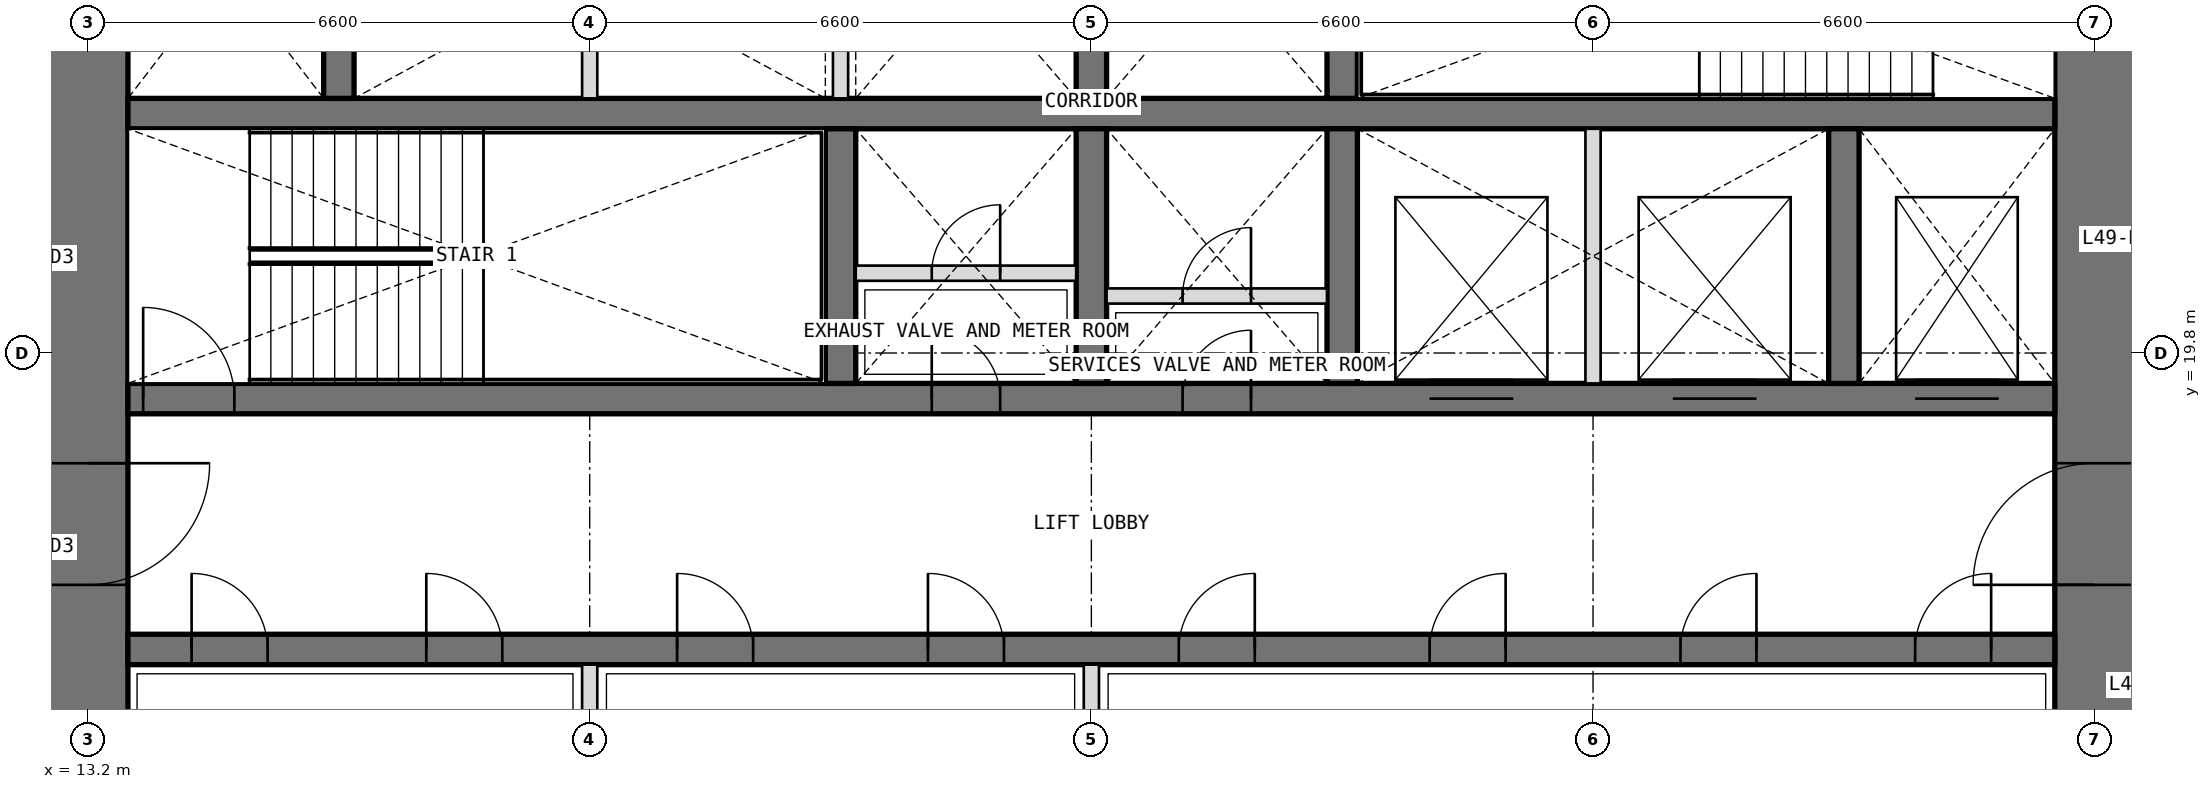
"""IFC4 building model, lengths in metres.
Left out: names, types, materials, properties, quantities, classifications, styles, units other than length and angle.
Written with IfcOpenShell. Run it as: python <this file> out.ifc"""

import sys

from ifc_helpers import new_model, si_unit, direction, frame, frame_2d, origin, place, context, subcontext, project, spatial, rectangle, extrude, element, fill, save


model = new_model("IFC4")
c1 = context("Model", 3, precision=1e-05, world=origin(), true_north=direction((0.0, 1.0)))
c2 = subcontext(c1, "Body", "Model", "MODEL_VIEW")
j1 = project(units=[si_unit("LENGTHUNIT", "METRE"), si_unit("PLANEANGLEUNIT", "RADIAN")], contexts=[c1])
p1 = place(None, origin())
s1 = spatial("IfcSite", under=j1, at=p1, CompositionType="ELEMENT")
p2 = place(p1, origin())
s2 = spatial("IfcBuilding", under=s1, at=p2, CompositionType="ELEMENT")
p3 = place(p2, frame((0.0, 0.0, 214.5)))
s3 = spatial("IfcBuildingStorey", under=s2, at=p3, CompositionType="ELEMENT", Elevation=214.5)
p4 = place(p3, frame((39.6, 13.725, 0.0), z_axis=(0.0, 0.0, 1.0), x_axis=(0.0, 1.0, 0.0)))
e1 = element("IfcWall", 1, at=p4, inside=s3, PredefinedType="SHEAR", context=c2, shape_type="SweptSolid", body=[
    extrude(rectangle(XDim=18.75, YDim=1.05, at=frame_2d((9.375, 0.0))), origin(), (0.0, 0.0, 1.0), 4.2),
])
p5 = place(p4, frame((3.025, 0.0, 0.0)))
e2 = element("IfcOpeningElement", 2, at=p5, cuts=e1, PredefinedType="OPENING", context=c2, shape_type="SweptSolid", body=[
    extrude(rectangle(XDim=1.6, YDim=2.1, at=frame_2d((0.8, 1.05))), frame((0.0, 0.535, 0.0), z_axis=(0.0, -1.0, 0.0), x_axis=(1.0, 0.0, 0.0)), (0.0, 0.0, 1.0), 1.07),
])
p6 = place(p4, frame((13.825, 0.0, 0.0)))
e3 = element("IfcOpeningElement", 3, at=p6, cuts=e1, PredefinedType="OPENING", context=c2, shape_type="SweptSolid", body=[
    extrude(rectangle(XDim=1.6, YDim=2.1, at=frame_2d((0.8, 1.05))), frame((0.0, 0.535, 0.0), z_axis=(0.0, -1.0, 0.0), x_axis=(1.0, 0.0, 0.0)), (0.0, 0.0, 1.0), 1.07),
])
p7 = place(p3, frame((13.2, 32.475, 0.0), z_axis=(0.0, 0.0, 1.0), x_axis=(0.0, -1.0, 0.0)))
e4 = element("IfcWall", 4, at=p7, inside=s3, PredefinedType="SHEAR", context=c2, shape_type="SweptSolid", body=[
    extrude(rectangle(XDim=18.75, YDim=1.05, at=frame_2d((9.375, 0.0))), origin(), (0.0, 0.0, 1.0), 4.2),
])
p8 = place(p7, frame((14.125, 0.0, 0.0)))
e5 = element("IfcOpeningElement", 5, at=p8, cuts=e4, PredefinedType="OPENING", context=c2, shape_type="SweptSolid", body=[
    extrude(rectangle(XDim=1.6, YDim=2.1, at=frame_2d((0.8, 1.05))), frame((0.0, 0.535, 0.0), z_axis=(0.0, -1.0, 0.0), x_axis=(1.0, 0.0, 0.0)), (0.0, 0.0, 1.0), 1.07),
])
p9 = place(p7, frame((3.325, 0.0, 0.0)))
e6 = element("IfcOpeningElement", 6, at=p9, cuts=e4, PredefinedType="OPENING", context=c2, shape_type="SweptSolid", body=[
    extrude(rectangle(XDim=1.6, YDim=2.1, at=frame_2d((0.8, 1.05))), frame((0.0, 0.535, 0.0), z_axis=(0.0, -1.0, 0.0), x_axis=(1.0, 0.0, 0.0)), (0.0, 0.0, 1.0), 1.07),
])
p10 = place(p3, frame((13.725, 15.9, 0.0), z_axis=(0.0, 0.0, 1.0), x_axis=(1.0, 0.0, 0.0)))
e7 = element("IfcWall", 7, at=p10, inside=s3, PredefinedType="SHEAR", context=c2, shape_type="SweptSolid", body=[
    extrude(rectangle(XDim=25.35, YDim=0.4, at=frame_2d((12.675, 0.0))), origin(), (0.0, 0.0, 1.0), 4.2),
])
p11 = place(p10, frame((0.837, 0.0, 0.0)))
e8 = element("IfcOpeningElement", 8, at=p11, cuts=e7, PredefinedType="OPENING", context=c2, shape_type="SweptSolid", body=[
    extrude(rectangle(XDim=1.0, YDim=2.1, at=frame_2d((0.5, 1.05))), frame((0.0, 0.21, 0.0), z_axis=(0.0, -1.0, 0.0), x_axis=(1.0, 0.0, 0.0)), (0.0, 0.0, 1.0), 0.42),
])
p12 = place(p10, frame((3.925, 0.0, 0.0)))
e9 = element("IfcOpeningElement", 9, at=p12, cuts=e7, PredefinedType="OPENING", context=c2, shape_type="SweptSolid", body=[
    extrude(rectangle(XDim=1.0, YDim=2.1, at=frame_2d((0.5, 1.05))), frame((0.0, 0.21, 0.0), z_axis=(0.0, -1.0, 0.0), x_axis=(1.0, 0.0, 0.0)), (0.0, 0.0, 1.0), 0.42),
])
p13 = place(p10, frame((7.225, 0.0, 0.0)))
e10 = element("IfcOpeningElement", 10, at=p13, cuts=e7, PredefinedType="OPENING", context=c2, shape_type="SweptSolid", body=[
    extrude(rectangle(XDim=1.0, YDim=2.1, at=frame_2d((0.5, 1.05))), frame((0.0, 0.21, 0.0), z_axis=(0.0, -1.0, 0.0), x_axis=(1.0, 0.0, 0.0)), (0.0, 0.0, 1.0), 0.42),
])
p14 = place(p10, frame((10.525, 0.0, 0.0)))
e11 = element("IfcOpeningElement", 11, at=p14, cuts=e7, PredefinedType="OPENING", context=c2, shape_type="SweptSolid", body=[
    extrude(rectangle(XDim=1.0, YDim=2.1, at=frame_2d((0.5, 1.05))), frame((0.0, 0.21, 0.0), z_axis=(0.0, -1.0, 0.0), x_axis=(1.0, 0.0, 0.0)), (0.0, 0.0, 1.0), 0.42),
])
p15 = place(p10, frame((13.825, 0.0, 0.0)))
e12 = element("IfcOpeningElement", 12, at=p15, cuts=e7, PredefinedType="OPENING", context=c2, shape_type="SweptSolid", body=[
    extrude(rectangle(XDim=1.0, YDim=2.1, at=frame_2d((0.5, 1.05))), frame((0.0, 0.21, 0.0), z_axis=(0.0, -1.0, 0.0), x_axis=(1.0, 0.0, 0.0)), (0.0, 0.0, 1.0), 0.42),
])
p16 = place(p10, frame((17.125, 0.0, 0.0)))
e13 = element("IfcOpeningElement", 13, at=p16, cuts=e7, PredefinedType="OPENING", context=c2, shape_type="SweptSolid", body=[
    extrude(rectangle(XDim=1.0, YDim=2.1, at=frame_2d((0.5, 1.05))), frame((0.0, 0.21, 0.0), z_axis=(0.0, -1.0, 0.0), x_axis=(1.0, 0.0, 0.0)), (0.0, 0.0, 1.0), 0.42),
])
p17 = place(p10, frame((20.425, 0.0, 0.0)))
e14 = element("IfcOpeningElement", 14, at=p17, cuts=e7, PredefinedType="OPENING", context=c2, shape_type="SweptSolid", body=[
    extrude(rectangle(XDim=1.0, YDim=2.1, at=frame_2d((0.5, 1.05))), frame((0.0, 0.21, 0.0), z_axis=(0.0, -1.0, 0.0), x_axis=(1.0, 0.0, 0.0)), (0.0, 0.0, 1.0), 0.42),
])
p18 = place(p10, frame((23.512, 0.0, 0.0)))
e15 = element("IfcOpeningElement", 15, at=p18, cuts=e7, PredefinedType="OPENING", context=c2, shape_type="SweptSolid", body=[
    extrude(rectangle(XDim=1.0, YDim=2.1, at=frame_2d((0.5, 1.05))), frame((0.0, 0.21, 0.0), z_axis=(0.0, -1.0, 0.0), x_axis=(1.0, 0.0, 0.0)), (0.0, 0.0, 1.0), 0.42),
])
p19 = place(p3, frame((13.725, 19.2, 0.0), z_axis=(0.0, 0.0, 1.0), x_axis=(1.0, 0.0, 0.0)))
e16 = element("IfcWall", 16, at=p19, inside=s3, PredefinedType="SHEAR", context=c2, shape_type="SweptSolid", body=[
    extrude(rectangle(XDim=25.35, YDim=0.4, at=frame_2d((12.675, 0.0))), origin(), (0.0, 0.0, 1.0), 4.2),
])
p20 = place(p19, frame((10.575, 0.0, 0.0)))
e17 = element("IfcOpeningElement", 17, at=p20, cuts=e16, PredefinedType="OPENING", context=c2, shape_type="SweptSolid", body=[
    extrude(rectangle(XDim=0.9, YDim=2.1, at=frame_2d((0.45, 1.05))), frame((0.0, 0.21, 0.0), z_axis=(0.0, -1.0, 0.0), x_axis=(1.0, 0.0, 0.0)), (0.0, 0.0, 1.0), 0.42),
])
p21 = place(p19, frame((13.875, 0.0, 0.0)))
e18 = element("IfcOpeningElement", 18, at=p21, cuts=e16, PredefinedType="OPENING", context=c2, shape_type="SweptSolid", body=[
    extrude(rectangle(XDim=0.9, YDim=2.1, at=frame_2d((0.45, 1.05))), frame((0.0, 0.21, 0.0), z_axis=(0.0, -1.0, 0.0), x_axis=(1.0, 0.0, 0.0)), (0.0, 0.0, 1.0), 0.42),
])
p22 = place(p19, frame((0.2, 0.0, 0.0)))
e19 = element("IfcOpeningElement", 19, at=p22, cuts=e16, PredefinedType="OPENING", context=c2, shape_type="SweptSolid", body=[
    extrude(rectangle(XDim=1.2, YDim=2.1, at=frame_2d((0.6, 1.05))), frame((0.0, 0.21, 0.0), z_axis=(0.0, -1.0, 0.0), x_axis=(1.0, 0.0, 0.0)), (0.0, 0.0, 1.0), 0.42),
])
p23 = place(p19, frame((23.512, 0.0, 0.0)))
e20 = element("IfcOpeningElement", 20, at=p23, cuts=e16, PredefinedType="OPENING", context=c2, shape_type="SweptSolid", body=[
    extrude(rectangle(XDim=1.1, YDim=2.1, at=frame_2d((0.55, 1.05))), frame((0.0, 0.21, 0.0), z_axis=(0.0, -1.0, 0.0), x_axis=(1.0, 0.0, 0.0)), (0.0, 0.0, 1.0), 0.42),
])
p24 = place(p19, frame((17.125, 0.0, 0.0)))
e21 = element("IfcOpeningElement", 21, at=p24, cuts=e16, PredefinedType="OPENING", context=c2, shape_type="SweptSolid", body=[
    extrude(rectangle(XDim=1.1, YDim=2.1, at=frame_2d((0.55, 1.05))), frame((0.0, 0.21, 0.0), z_axis=(0.0, -1.0, 0.0), x_axis=(1.0, 0.0, 0.0)), (0.0, 0.0, 1.0), 0.42),
])
p25 = place(p19, frame((20.325, 0.0, 0.0)))
e22 = element("IfcOpeningElement", 22, at=p25, cuts=e16, PredefinedType="OPENING", context=c2, shape_type="SweptSolid", body=[
    extrude(rectangle(XDim=1.1, YDim=2.1, at=frame_2d((0.55, 1.05))), frame((0.0, 0.21, 0.0), z_axis=(0.0, -1.0, 0.0), x_axis=(1.0, 0.0, 0.0)), (0.0, 0.0, 1.0), 0.42),
])
p26 = place(p3, frame((13.725, 22.95, 0.0), z_axis=(0.0, 0.0, 1.0), x_axis=(1.0, 0.0, 0.0)))
e23 = element("IfcWall", 23, at=p26, inside=s3, PredefinedType="SHEAR", context=c2, shape_type="SweptSolid", body=[
    extrude(rectangle(XDim=25.35, YDim=0.4, at=frame_2d((12.675, 0.0))), origin(), (0.0, 0.0, 1.0), 4.2),
])
for number, where, z_axis, x_axis in (
    (24, (23.1, 19.4, 0.0), (0.0, 0.0, 1.0), (0.0, 1.0, 0.0)),
    (25, (26.4, 19.4, 0.0), (0.0, 0.0, 1.0), (0.0, 1.0, 0.0)),
    (26, (29.7, 19.4, 0.0), (0.0, 0.0, 1.0), (0.0, 1.0, 0.0)),
    (27, (36.3, 19.4, 0.0), (0.0, 0.0, 1.0), (0.0, 1.0, 0.0)),
    (28, (16.5, 23.15, 0.0), (0.0, 0.0, 1.0), (0.0, 1.0, 0.0)),
    (29, (26.4, 23.15, 0.0), (0.0, 0.0, 1.0), (0.0, 1.0, 0.0)),
    (30, (29.7, 23.15, 0.0), (0.0, 0.0, 1.0), (0.0, 1.0, 0.0)),
):
    element("IfcWall", number, at=place(p3, frame(where, z_axis=z_axis, x_axis=x_axis)), inside=s3, PredefinedType="SHEAR", context=c2, shape_type="SweptSolid", body=[
        extrude(rectangle(XDim=3.35, YDim=0.4, at=frame_2d((1.675, 0.0))), origin(), (0.0, 0.0, 1.0), 4.2),
    ])
for number, where, z_axis, x_axis in (
    (31, (19.8, 13.725, 0.0), (0.0, 0.0, 1.0), (0.0, 1.0, 0.0)),
    (32, (26.4, 13.725, 0.0), (0.0, 0.0, 1.0), (0.0, 1.0, 0.0)),
):
    element("IfcWall", number, at=place(p3, frame(where, z_axis=z_axis, x_axis=x_axis)), inside=s3, PredefinedType="PARTITIONING", context=c2, shape_type="SweptSolid", body=[
        extrude(rectangle(XDim=1.975, YDim=0.2, at=frame_2d((0.987, 0.0))), origin(), (0.0, 0.0, 1.0), 4.2),
    ])
for number, where, z_axis, x_axis in (
    (33, (33.0, 19.4, 0.0), (0.0, 0.0, 1.0), (0.0, 1.0, 0.0)),
    (34, (19.8, 23.15, 0.0), (0.0, 0.0, 1.0), (0.0, 1.0, 0.0)),
    (35, (23.1, 23.15, 0.0), (0.0, 0.0, 1.0), (0.0, 1.0, 0.0)),
):
    element("IfcWall", number, at=place(p3, frame(where, z_axis=z_axis, x_axis=x_axis)), inside=s3, PredefinedType="PARTITIONING", context=c2, shape_type="SweptSolid", body=[
        extrude(rectangle(XDim=3.35, YDim=0.2, at=frame_2d((1.675, 0.0))), origin(), (0.0, 0.0, 1.0), 4.2),
    ])
p27 = place(p3, frame((23.3, 20.85, 0.0), z_axis=(0.0, 0.0, 1.0), x_axis=(1.0, 0.0, 0.0)))
e36 = element("IfcWall", 36, at=p27, inside=s3, PredefinedType="PARTITIONING", context=c2, shape_type="SweptSolid", body=[
    extrude(rectangle(XDim=2.9, YDim=0.2, at=frame_2d((1.45, 0.0))), origin(), (0.0, 0.0, 1.0), 3.9),
])
p28 = place(p27, frame((1.0, 0.0, 0.0)))
e37 = element("IfcOpeningElement", 37, at=p28, cuts=e36, PredefinedType="OPENING", context=c2, shape_type="SweptSolid", body=[
    extrude(rectangle(XDim=0.9, YDim=2.1, at=frame_2d((0.45, 1.05))), frame((0.0, 0.11, 0.0), z_axis=(0.0, -1.0, 0.0), x_axis=(1.0, 0.0, 0.0)), (0.0, 0.0, 1.0), 0.22),
])
p29 = place(p3, frame((26.6, 20.55, 0.0), z_axis=(0.0, 0.0, 1.0), x_axis=(1.0, 0.0, 0.0)))
e38 = element("IfcWall", 38, at=p29, inside=s3, PredefinedType="PARTITIONING", context=c2, shape_type="SweptSolid", body=[
    extrude(rectangle(XDim=2.9, YDim=0.2, at=frame_2d((1.45, 0.0))), origin(), (0.0, 0.0, 1.0), 3.9),
])
p30 = place(p29, frame((1.0, 0.0, 0.0)))
e39 = element("IfcOpeningElement", 39, at=p30, cuts=e38, PredefinedType="OPENING", context=c2, shape_type="SweptSolid", body=[
    extrude(rectangle(XDim=0.9, YDim=2.1, at=frame_2d((0.45, 1.05))), frame((0.0, 0.11, 0.0), z_axis=(0.0, -1.0, 0.0), x_axis=(1.0, 0.0, 0.0)), (0.0, 0.0, 1.0), 0.22),
])
p31 = place(p20, origin())
e40 = element("IfcDoor", 40, at=p31, inside=s3, OperationType="SINGLE_SWING_LEFT", PredefinedType="DOOR", context=c2, shape_type="SweptSolid", body=[
    extrude(rectangle(XDim=0.9, YDim=2.1, at=frame_2d((0.45, 1.05))), frame((0.0, 0.025, 0.0), z_axis=(0.0, -1.0, 0.0), x_axis=(1.0, 0.0, 0.0)), (0.0, 0.0, 1.0), 0.05),
])
fill(e17, e40)
p32 = place(p28, origin())
e41 = element("IfcDoor", 41, at=p32, inside=s3, OperationType="SINGLE_SWING_RIGHT", PredefinedType="DOOR", context=c2, shape_type="SweptSolid", body=[
    extrude(rectangle(XDim=0.9, YDim=2.1, at=frame_2d((0.45, 1.05))), frame((0.0, 0.025, 0.0), z_axis=(0.0, -1.0, 0.0), x_axis=(1.0, 0.0, 0.0)), (0.0, 0.0, 1.0), 0.05),
])
fill(e37, e41)
p33 = place(p21, origin())
e42 = element("IfcDoor", 42, at=p33, inside=s3, OperationType="SINGLE_SWING_RIGHT", PredefinedType="DOOR", context=c2, shape_type="SweptSolid", body=[
    extrude(rectangle(XDim=0.9, YDim=2.1, at=frame_2d((0.45, 1.05))), frame((0.0, 0.025, 0.0), z_axis=(0.0, -1.0, 0.0), x_axis=(1.0, 0.0, 0.0)), (0.0, 0.0, 1.0), 0.05),
])
fill(e18, e42)
p34 = place(p30, origin())
e43 = element("IfcDoor", 43, at=p34, inside=s3, OperationType="SINGLE_SWING_RIGHT", PredefinedType="DOOR", context=c2, shape_type="SweptSolid", body=[
    extrude(rectangle(XDim=0.9, YDim=2.1, at=frame_2d((0.45, 1.05))), frame((0.0, 0.025, 0.0), z_axis=(0.0, -1.0, 0.0), x_axis=(1.0, 0.0, 0.0)), (0.0, 0.0, 1.0), 0.05),
])
fill(e39, e43)
p35 = place(p11, origin())
e44 = element("IfcDoor", 44, at=p35, inside=s3, OperationType="SINGLE_SWING_LEFT", PredefinedType="DOOR", context=c2, shape_type="SweptSolid", body=[
    extrude(rectangle(XDim=1.0, YDim=2.1, at=frame_2d((0.5, 1.05))), frame((0.0, 0.025, 0.0), z_axis=(0.0, -1.0, 0.0), x_axis=(1.0, 0.0, 0.0)), (0.0, 0.0, 1.0), 0.05),
])
fill(e8, e44)
p36 = place(p12, origin())
e45 = element("IfcDoor", 45, at=p36, inside=s3, OperationType="SINGLE_SWING_LEFT", PredefinedType="DOOR", context=c2, shape_type="SweptSolid", body=[
    extrude(rectangle(XDim=1.0, YDim=2.1, at=frame_2d((0.5, 1.05))), frame((0.0, 0.025, 0.0), z_axis=(0.0, -1.0, 0.0), x_axis=(1.0, 0.0, 0.0)), (0.0, 0.0, 1.0), 0.05),
])
fill(e9, e45)
p37 = place(p13, origin())
e46 = element("IfcDoor", 46, at=p37, inside=s3, OperationType="SINGLE_SWING_LEFT", PredefinedType="DOOR", context=c2, shape_type="SweptSolid", body=[
    extrude(rectangle(XDim=1.0, YDim=2.1, at=frame_2d((0.5, 1.05))), frame((0.0, 0.025, 0.0), z_axis=(0.0, -1.0, 0.0), x_axis=(1.0, 0.0, 0.0)), (0.0, 0.0, 1.0), 0.05),
])
fill(e10, e46)
p38 = place(p14, origin())
e47 = element("IfcDoor", 47, at=p38, inside=s3, OperationType="SINGLE_SWING_LEFT", PredefinedType="DOOR", context=c2, shape_type="SweptSolid", body=[
    extrude(rectangle(XDim=1.0, YDim=2.1, at=frame_2d((0.5, 1.05))), frame((0.0, 0.025, 0.0), z_axis=(0.0, -1.0, 0.0), x_axis=(1.0, 0.0, 0.0)), (0.0, 0.0, 1.0), 0.05),
])
fill(e11, e47)
p39 = place(p15, origin())
e48 = element("IfcDoor", 48, at=p39, inside=s3, OperationType="SINGLE_SWING_RIGHT", PredefinedType="DOOR", context=c2, shape_type="SweptSolid", body=[
    extrude(rectangle(XDim=1.0, YDim=2.1, at=frame_2d((0.5, 1.05))), frame((0.0, 0.025, 0.0), z_axis=(0.0, -1.0, 0.0), x_axis=(1.0, 0.0, 0.0)), (0.0, 0.0, 1.0), 0.05),
])
fill(e12, e48)
p40 = place(p16, origin())
e49 = element("IfcDoor", 49, at=p40, inside=s3, OperationType="SINGLE_SWING_RIGHT", PredefinedType="DOOR", context=c2, shape_type="SweptSolid", body=[
    extrude(rectangle(XDim=1.0, YDim=2.1, at=frame_2d((0.5, 1.05))), frame((0.0, 0.025, 0.0), z_axis=(0.0, -1.0, 0.0), x_axis=(1.0, 0.0, 0.0)), (0.0, 0.0, 1.0), 0.05),
])
fill(e13, e49)
p41 = place(p17, origin())
e50 = element("IfcDoor", 50, at=p41, inside=s3, OperationType="SINGLE_SWING_RIGHT", PredefinedType="DOOR", context=c2, shape_type="SweptSolid", body=[
    extrude(rectangle(XDim=1.0, YDim=2.1, at=frame_2d((0.5, 1.05))), frame((0.0, 0.025, 0.0), z_axis=(0.0, -1.0, 0.0), x_axis=(1.0, 0.0, 0.0)), (0.0, 0.0, 1.0), 0.05),
])
fill(e14, e50)
p42 = place(p18, origin())
e51 = element("IfcDoor", 51, at=p42, inside=s3, OperationType="SINGLE_SWING_RIGHT", PredefinedType="DOOR", context=c2, shape_type="SweptSolid", body=[
    extrude(rectangle(XDim=1.0, YDim=2.1, at=frame_2d((0.5, 1.05))), frame((0.0, 0.025, 0.0), z_axis=(0.0, -1.0, 0.0), x_axis=(1.0, 0.0, 0.0)), (0.0, 0.0, 1.0), 0.05),
])
fill(e15, e51)
p43 = place(p22, origin())
e52 = element("IfcDoor", 52, at=p43, inside=s3, OperationType="SINGLE_SWING_LEFT", PredefinedType="DOOR", context=c2, shape_type="SweptSolid", body=[
    extrude(rectangle(XDim=1.2, YDim=2.1, at=frame_2d((0.6, 1.05))), frame((0.0, 0.025, 0.0), z_axis=(0.0, -1.0, 0.0), x_axis=(1.0, 0.0, 0.0)), (0.0, 0.0, 1.0), 0.05),
])
fill(e19, e52)
p44 = place(p8, origin())
e53 = element("IfcDoor", 53, at=p44, inside=s3, OperationType="DOUBLE_DOOR_DOUBLE_SWING", PredefinedType="DOOR", context=c2, shape_type="SweptSolid", body=[
    extrude(rectangle(XDim=1.6, YDim=2.1, at=frame_2d((0.8, 1.05))), frame((0.0, 0.025, 0.0), z_axis=(0.0, -1.0, 0.0), x_axis=(1.0, 0.0, 0.0)), (0.0, 0.0, 1.0), 0.05),
])
fill(e5, e53)
p45 = place(p5, origin())
e54 = element("IfcDoor", 54, at=p45, inside=s3, OperationType="DOUBLE_DOOR_DOUBLE_SWING", PredefinedType="DOOR", context=c2, shape_type="SweptSolid", body=[
    extrude(rectangle(XDim=1.6, YDim=2.1, at=frame_2d((0.8, 1.05))), frame((0.0, 0.025, 0.0), z_axis=(0.0, -1.0, 0.0), x_axis=(1.0, 0.0, 0.0)), (0.0, 0.0, 1.0), 0.05),
])
fill(e2, e54)
p46 = place(p23, origin())
e55 = element("IfcDoor", 55, at=p46, inside=s3, OperationType="DOUBLE_DOOR_SLIDING", PredefinedType="DOOR", context=c2, shape_type="SweptSolid", body=[
    extrude(rectangle(XDim=1.1, YDim=2.1, at=frame_2d((0.55, 1.05))), frame((0.0, 0.025, 0.0), z_axis=(0.0, -1.0, 0.0), x_axis=(1.0, 0.0, 0.0)), (0.0, 0.0, 1.0), 0.05),
])
fill(e20, e55)
p47 = place(p24, origin())
e56 = element("IfcDoor", 56, at=p47, inside=s3, OperationType="DOUBLE_DOOR_SLIDING", PredefinedType="DOOR", context=c2, shape_type="SweptSolid", body=[
    extrude(rectangle(XDim=1.1, YDim=2.1, at=frame_2d((0.55, 1.05))), frame((0.0, 0.025, 0.0), z_axis=(0.0, -1.0, 0.0), x_axis=(1.0, 0.0, 0.0)), (0.0, 0.0, 1.0), 0.05),
])
fill(e21, e56)
p48 = place(p25, origin())
e57 = element("IfcDoor", 57, at=p48, inside=s3, OperationType="DOUBLE_DOOR_SLIDING", PredefinedType="DOOR", context=c2, shape_type="SweptSolid", body=[
    extrude(rectangle(XDim=1.1, YDim=2.1, at=frame_2d((0.55, 1.05))), frame((0.0, 0.025, 0.0), z_axis=(0.0, -1.0, 0.0), x_axis=(1.0, 0.0, 0.0)), (0.0, 0.0, 1.0), 0.05),
])
fill(e22, e57)
save(model, sys.argv[1])
